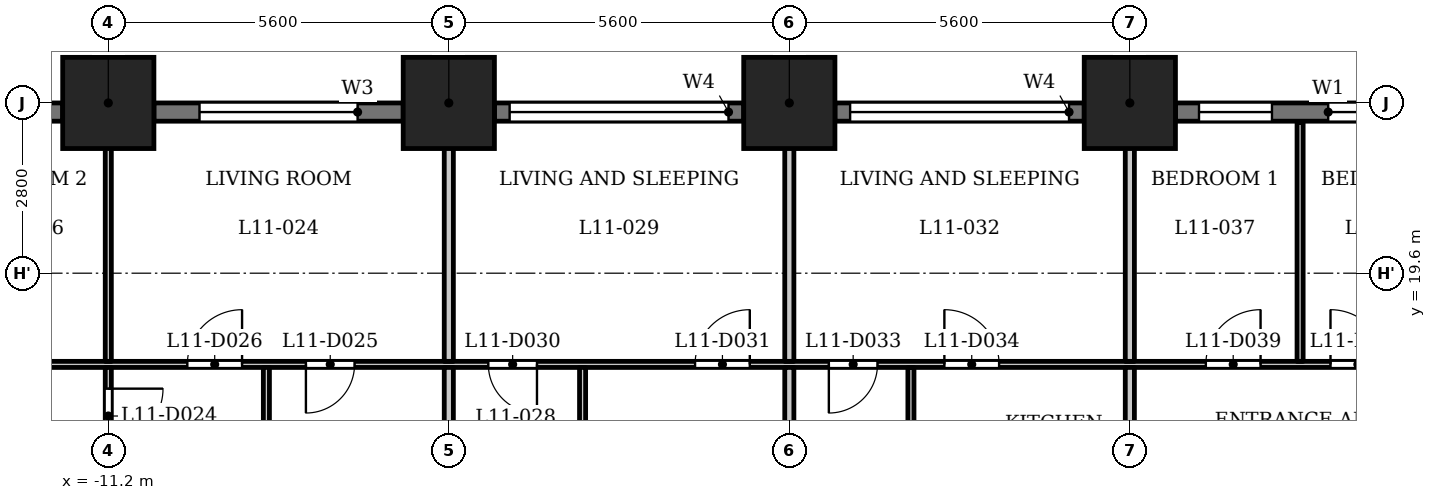
"""IFC4 building model, lengths in metres.
Left out: names, types, materials, properties, quantities, classifications, styles, units other than length and angle.
Written with IfcOpenShell. Run it as: python <this file> out.ifc"""

import sys

from ifc_helpers import new_model, si_unit, direction, frame, frame_2d, origin, origin_2d, place, context, subcontext, project, spatial, rectangle, extrude, element, fill, save


model = new_model("IFC4")
c1 = context("Model", 3, precision=1e-05, world=origin(), true_north=direction((0.0, 1.0)))
c2 = subcontext(c1, "Body", "Model", "MODEL_VIEW")
j1 = project(units=[si_unit("LENGTHUNIT", "METRE"), si_unit("PLANEANGLEUNIT", "RADIAN")], contexts=[c1])
p1 = place(None, origin())
s1 = spatial("IfcSite", under=j1, at=p1, CompositionType="ELEMENT")
p2 = place(p1, origin())
s2 = spatial("IfcBuilding", under=s1, at=p2, CompositionType="ELEMENT")
p3 = place(p2, frame((0.0, 0.0, 48.0)))
s3 = spatial("IfcBuildingStorey", under=s2, at=p3, CompositionType="ELEMENT", Elevation=48.0)
for number, where, z_axis, x_axis in (
    (1, (5.6, 22.4, 0.0), (0.0, 0.0, 1.0), (1.0, 0.0, 0.0)),
    (2, (0.0, 22.4, 0.0), (0.0, 0.0, 1.0), (1.0, 0.0, 0.0)),
    (3, (-5.6, 22.4, 0.0), (0.0, 0.0, 1.0), (1.0, 0.0, 0.0)),
    (4, (-11.2, 22.4, 0.0), (0.0, 0.0, 1.0), (1.0, 0.0, 0.0)),
):
    element("IfcColumn", number, at=place(p3, frame(where, z_axis=z_axis, x_axis=x_axis)), inside=s3, PredefinedType="COLUMN", context=c2, shape_type="SweptSolid", body=[
        extrude(rectangle(XDim=1.5, YDim=1.5, at=origin_2d()), origin(), (0.0, 0.0, 1.0), 3.5),
    ])
p4 = place(p3, frame((10.45, 22.25, 0.0), z_axis=(0.0, 0.0, 1.0), x_axis=(-1.0, 0.0, 0.0)))
e5 = element("IfcWall", 5, at=p4, inside=s3, PredefinedType="SOLIDWALL", context=c2, shape_type="SweptSolid", body=[
    extrude(rectangle(XDim=4.1, YDim=0.3, at=frame_2d((2.05, 0.0))), origin(), (0.0, 0.0, 1.0), 2.35),
])
p5 = place(p4, frame((0.387, 0.0, 0.6)))
e6 = element("IfcOpeningElement", 6, at=p5, cuts=e5, PredefinedType="OPENING", context=c2, shape_type="SweptSolid", body=[
    extrude(rectangle(XDim=1.2, YDim=1.55, at=frame_2d((0.6, 0.775))), frame((0.0, 0.16, 0.0), z_axis=(0.0, -1.0, 0.0), x_axis=(1.0, 0.0, 0.0)), (0.0, 0.0, 1.0), 0.32),
])
p6 = place(p4, frame((2.512, 0.0, 0.6)))
e7 = element("IfcOpeningElement", 7, at=p6, cuts=e5, PredefinedType="OPENING", context=c2, shape_type="SweptSolid", body=[
    extrude(rectangle(XDim=1.2, YDim=1.55, at=frame_2d((0.6, 0.775))), frame((0.0, 0.16, 0.0), z_axis=(0.0, -1.0, 0.0), x_axis=(1.0, 0.0, 0.0)), (0.0, 0.0, 1.0), 0.32),
])
p7 = place(p3, frame((4.85, 22.25, 0.0), z_axis=(0.0, 0.0, 1.0), x_axis=(-1.0, 0.0, 0.0)))
e8 = element("IfcWall", 8, at=p7, inside=s3, PredefinedType="SOLIDWALL", context=c2, shape_type="SweptSolid", body=[
    extrude(rectangle(XDim=4.1, YDim=0.3, at=frame_2d((2.05, 0.0))), origin(), (0.0, 0.0, 1.0), 2.35),
])
p8 = place(p7, frame((0.25, 0.0, 1.2)))
e9 = element("IfcOpeningElement", 9, at=p8, cuts=e8, PredefinedType="OPENING", context=c2, shape_type="SweptSolid", body=[
    extrude(rectangle(XDim=3.6, YDim=0.95, at=frame_2d((1.8, 0.475))), frame((0.0, 0.16, 0.0), z_axis=(0.0, -1.0, 0.0), x_axis=(1.0, 0.0, 0.0)), (0.0, 0.0, 1.0), 0.32),
])
p9 = place(p3, frame((-0.75, 22.25, 0.0), z_axis=(0.0, 0.0, 1.0), x_axis=(-1.0, 0.0, 0.0)))
e10 = element("IfcWall", 10, at=p9, inside=s3, PredefinedType="SOLIDWALL", context=c2, shape_type="SweptSolid", body=[
    extrude(rectangle(XDim=4.1, YDim=0.3, at=frame_2d((2.05, 0.0))), origin(), (0.0, 0.0, 1.0), 2.35),
])
p10 = place(p9, frame((0.25, 0.0, 1.2)))
e11 = element("IfcOpeningElement", 11, at=p10, cuts=e10, PredefinedType="OPENING", context=c2, shape_type="SweptSolid", body=[
    extrude(rectangle(XDim=3.6, YDim=0.95, at=frame_2d((1.8, 0.475))), frame((0.0, 0.16, 0.0), z_axis=(0.0, -1.0, 0.0), x_axis=(1.0, 0.0, 0.0)), (0.0, 0.0, 1.0), 0.32),
])
p11 = place(p3, frame((-6.35, 22.25, 0.0), z_axis=(0.0, 0.0, 1.0), x_axis=(-1.0, 0.0, 0.0)))
e12 = element("IfcWall", 12, at=p11, inside=s3, PredefinedType="SOLIDWALL", context=c2, shape_type="SweptSolid", body=[
    extrude(rectangle(XDim=4.1, YDim=0.3, at=frame_2d((2.05, 0.0))), origin(), (0.0, 0.0, 1.0), 2.35),
])
p12 = place(p11, frame((0.75, 0.0, 0.9)))
e13 = element("IfcOpeningElement", 13, at=p12, cuts=e12, PredefinedType="OPENING", context=c2, shape_type="SweptSolid", body=[
    extrude(rectangle(XDim=2.6, YDim=1.25, at=frame_2d((1.3, 0.625))), frame((0.0, 0.16, 0.0), z_axis=(0.0, -1.0, 0.0), x_axis=(1.0, 0.0, 0.0)), (0.0, 0.0, 1.0), 0.32),
])
p13 = place(p3, frame((-11.95, 22.25, 0.0), z_axis=(0.0, 0.0, 1.0), x_axis=(-1.0, 0.0, 0.0)))
e14 = element("IfcWall", 14, at=p13, inside=s3, PredefinedType="SOLIDWALL", context=c2, shape_type="SweptSolid", body=[
    extrude(rectangle(XDim=4.1, YDim=0.3, at=frame_2d((2.05, 0.0))), origin(), (0.0, 0.0, 1.0), 2.35),
])
p14 = place(p13, frame((0.387, 0.0, 0.6)))
e15 = element("IfcOpeningElement", 15, at=p14, cuts=e14, PredefinedType="OPENING", context=c2, shape_type="SweptSolid", body=[
    extrude(rectangle(XDim=1.2, YDim=1.55, at=frame_2d((0.6, 0.775))), frame((0.0, 0.16, 0.0), z_axis=(0.0, -1.0, 0.0), x_axis=(1.0, 0.0, 0.0)), (0.0, 0.0, 1.0), 0.32),
])
p15 = place(p13, frame((2.512, 0.0, 0.6)))
e16 = element("IfcOpeningElement", 16, at=p15, cuts=e14, PredefinedType="OPENING", context=c2, shape_type="SweptSolid", body=[
    extrude(rectangle(XDim=1.2, YDim=1.55, at=frame_2d((0.6, 0.775))), frame((0.0, 0.16, 0.0), z_axis=(0.0, -1.0, 0.0), x_axis=(1.0, 0.0, 0.0)), (0.0, 0.0, 1.0), 0.32),
])
p16 = place(p3, frame((-26.44, 18.1, 0.0), z_axis=(0.0, 0.0, 1.0), x_axis=(1.0, 0.0, 0.0)))
e17 = element("IfcWall", 17, at=p16, inside=s3, PredefinedType="PARTITIONING", context=c2, shape_type="SweptSolid", body=[
    extrude(rectangle(XDim=52.63, YDim=0.1, at=frame_2d((26.315, 0.0))), origin(), (0.0, 0.0, 1.0), 3.2),
])
p17 = place(p16, frame((2.626, 0.0, 0.0)))
e18 = element("IfcOpeningElement", 18, at=p17, cuts=e17, PredefinedType="OPENING", context=c2, shape_type="SweptSolid", body=[
    extrude(rectangle(XDim=0.8, YDim=2.1, at=frame_2d((0.4, 1.05))), frame((0.0, 0.06, 0.0), z_axis=(0.0, -1.0, 0.0), x_axis=(1.0, 0.0, 0.0)), (0.0, 0.0, 1.0), 0.12),
])
p18 = place(p16, frame((7.84, 0.0, 0.0)))
e19 = element("IfcOpeningElement", 19, at=p18, cuts=e17, PredefinedType="OPENING", context=c2, shape_type="SweptSolid", body=[
    extrude(rectangle(XDim=0.9, YDim=2.1, at=frame_2d((0.45, 1.05))), frame((0.0, 0.06, 0.0), z_axis=(0.0, -1.0, 0.0), x_axis=(1.0, 0.0, 0.0)), (0.0, 0.0, 1.0), 0.12),
])
p19 = place(p16, frame((18.49, 0.0, 0.0)))
e20 = element("IfcOpeningElement", 20, at=p19, cuts=e17, PredefinedType="OPENING", context=c2, shape_type="SweptSolid", body=[
    extrude(rectangle(XDim=0.8, YDim=2.1, at=frame_2d((0.4, 1.05))), frame((0.0, 0.06, 0.0), z_axis=(0.0, -1.0, 0.0), x_axis=(1.0, 0.0, 0.0)), (0.0, 0.0, 1.0), 0.12),
])
p20 = place(p16, frame((16.54, 0.0, 0.0)))
e21 = element("IfcOpeningElement", 21, at=p20, cuts=e17, PredefinedType="OPENING", context=c2, shape_type="SweptSolid", body=[
    extrude(rectangle(XDim=0.9, YDim=2.1, at=frame_2d((0.45, 1.05))), frame((0.0, 0.06, 0.0), z_axis=(0.0, -1.0, 0.0), x_axis=(1.0, 0.0, 0.0)), (0.0, 0.0, 1.0), 0.12),
])
p21 = place(p16, frame((10.89, 0.0, 0.0)))
e22 = element("IfcOpeningElement", 22, at=p21, cuts=e17, PredefinedType="OPENING", context=c2, shape_type="SweptSolid", body=[
    extrude(rectangle(XDim=0.9, YDim=2.1, at=frame_2d((0.45, 1.05))), frame((0.0, 0.06, 0.0), z_axis=(0.0, -1.0, 0.0), x_axis=(1.0, 0.0, 0.0)), (0.0, 0.0, 1.0), 0.12),
])
p22 = place(p16, frame((12.94, 0.0, 0.0)))
e23 = element("IfcOpeningElement", 23, at=p22, cuts=e17, PredefinedType="OPENING", context=c2, shape_type="SweptSolid", body=[
    extrude(rectangle(XDim=0.9, YDim=2.1, at=frame_2d((0.45, 1.05))), frame((0.0, 0.06, 0.0), z_axis=(0.0, -1.0, 0.0), x_axis=(1.0, 0.0, 0.0)), (0.0, 0.0, 1.0), 0.12),
])
p23 = place(p16, frame((21.49, 0.0, 0.0)))
e24 = element("IfcOpeningElement", 24, at=p23, cuts=e17, PredefinedType="OPENING", context=c2, shape_type="SweptSolid", body=[
    extrude(rectangle(XDim=0.8, YDim=2.1, at=frame_2d((0.4, 1.05))), frame((0.0, 0.06, 0.0), z_axis=(0.0, -1.0, 0.0), x_axis=(1.0, 0.0, 0.0)), (0.0, 0.0, 1.0), 0.12),
])
p24 = place(p16, frame((24.89, 0.0, 0.0)))
e25 = element("IfcOpeningElement", 25, at=p24, cuts=e17, PredefinedType="OPENING", context=c2, shape_type="SweptSolid", body=[
    extrude(rectangle(XDim=0.9, YDim=2.1, at=frame_2d((0.45, 1.05))), frame((0.0, 0.06, 0.0), z_axis=(0.0, -1.0, 0.0), x_axis=(1.0, 0.0, 0.0)), (0.0, 0.0, 1.0), 0.12),
])
p25 = place(p16, frame((27.09, 0.0, 0.0)))
e26 = element("IfcOpeningElement", 26, at=p25, cuts=e17, PredefinedType="OPENING", context=c2, shape_type="SweptSolid", body=[
    extrude(rectangle(XDim=0.8, YDim=2.1, at=frame_2d((0.4, 1.05))), frame((0.0, 0.06, 0.0), z_axis=(0.0, -1.0, 0.0), x_axis=(1.0, 0.0, 0.0)), (0.0, 0.0, 1.0), 0.12),
])
p26 = place(p16, frame((28.99, 0.0, 0.0)))
e27 = element("IfcOpeningElement", 27, at=p26, cuts=e17, PredefinedType="OPENING", context=c2, shape_type="SweptSolid", body=[
    extrude(rectangle(XDim=0.9, YDim=2.1, at=frame_2d((0.45, 1.05))), frame((0.0, 0.06, 0.0), z_axis=(0.0, -1.0, 0.0), x_axis=(1.0, 0.0, 0.0)), (0.0, 0.0, 1.0), 0.12),
])
p27 = place(p16, frame((41.69, 0.0, 0.0)))
e28 = element("IfcOpeningElement", 28, at=p27, cuts=e17, PredefinedType="OPENING", context=c2, shape_type="SweptSolid", body=[
    extrude(rectangle(XDim=0.8, YDim=2.1, at=frame_2d((0.4, 1.05))), frame((0.0, 0.06, 0.0), z_axis=(0.0, -1.0, 0.0), x_axis=(1.0, 0.0, 0.0)), (0.0, 0.0, 1.0), 0.12),
])
p28 = place(p16, frame((38.99, 0.0, 0.0)))
e29 = element("IfcOpeningElement", 29, at=p28, cuts=e17, PredefinedType="OPENING", context=c2, shape_type="SweptSolid", body=[
    extrude(rectangle(XDim=0.9, YDim=2.1, at=frame_2d((0.45, 1.05))), frame((0.0, 0.06, 0.0), z_axis=(0.0, -1.0, 0.0), x_axis=(1.0, 0.0, 0.0)), (0.0, 0.0, 1.0), 0.12),
])
p29 = place(p16, frame((33.29, 0.0, 0.0)))
e30 = element("IfcOpeningElement", 30, at=p29, cuts=e17, PredefinedType="OPENING", context=c2, shape_type="SweptSolid", body=[
    extrude(rectangle(XDim=0.9, YDim=2.1, at=frame_2d((0.45, 1.05))), frame((0.0, 0.06, 0.0), z_axis=(0.0, -1.0, 0.0), x_axis=(1.0, 0.0, 0.0)), (0.0, 0.0, 1.0), 0.12),
])
p30 = place(p16, frame((35.34, 0.0, 0.0)))
e31 = element("IfcOpeningElement", 31, at=p30, cuts=e17, PredefinedType="OPENING", context=c2, shape_type="SweptSolid", body=[
    extrude(rectangle(XDim=0.9, YDim=2.1, at=frame_2d((0.45, 1.05))), frame((0.0, 0.06, 0.0), z_axis=(0.0, -1.0, 0.0), x_axis=(1.0, 0.0, 0.0)), (0.0, 0.0, 1.0), 0.12),
])
p31 = place(p16, frame((50.74, 0.0, 0.0)))
e32 = element("IfcOpeningElement", 32, at=p31, cuts=e17, PredefinedType="OPENING", context=c2, shape_type="SweptSolid", body=[
    extrude(rectangle(XDim=0.8, YDim=2.1, at=frame_2d((0.4, 1.05))), frame((0.0, 0.06, 0.0), z_axis=(0.0, -1.0, 0.0), x_axis=(1.0, 0.0, 0.0)), (0.0, 0.0, 1.0), 0.12),
])
p32 = place(p16, frame((47.29, 0.0, 0.0)))
e33 = element("IfcOpeningElement", 33, at=p32, cuts=e17, PredefinedType="OPENING", context=c2, shape_type="SweptSolid", body=[
    extrude(rectangle(XDim=0.9, YDim=2.1, at=frame_2d((0.45, 1.05))), frame((0.0, 0.06, 0.0), z_axis=(0.0, -1.0, 0.0), x_axis=(1.0, 0.0, 0.0)), (0.0, 0.0, 1.0), 0.12),
])
p33 = place(p3, frame((-11.2, 15.475, 0.0), z_axis=(0.0, 0.0, 1.0), x_axis=(0.0, 1.0, 0.0)))
e34 = element("IfcWall", 34, at=p33, inside=s3, PredefinedType="PARTITIONING", context=c2, shape_type="SweptSolid", body=[
    extrude(rectangle(XDim=2.575, YDim=0.1, at=frame_2d((1.288, 0.0))), origin(), (0.0, 0.0, 1.0), 3.2),
])
p34 = place(p33, frame((1.326, 0.0, 0.0)))
e35 = element("IfcOpeningElement", 35, at=p34, cuts=e34, PredefinedType="OPENING", context=c2, shape_type="SweptSolid", body=[
    extrude(rectangle(XDim=0.9, YDim=2.1, at=frame_2d((0.45, 1.05))), frame((0.0, 0.06, 0.0), z_axis=(0.0, -1.0, 0.0), x_axis=(1.0, 0.0, 0.0)), (0.0, 0.0, 1.0), 0.12),
])
p35 = place(p3, frame((-11.2, 18.15, 0.0), z_axis=(0.0, 0.0, 1.0), x_axis=(0.0, 1.0, 0.0)))
e36 = element("IfcWall", 36, at=p35, inside=s3, PredefinedType="PARTITIONING", context=c2, shape_type="SweptSolid", body=[
    extrude(rectangle(XDim=4.98, YDim=0.1, at=frame_2d((2.49, 0.0))), origin(), (0.0, 0.0, 1.0), 3.2),
])
p36 = place(p3, frame((-8.6, 15.475, 0.0), z_axis=(0.0, 0.0, 1.0), x_axis=(0.0, 1.0, 0.0)))
e37 = element("IfcWall", 37, at=p36, inside=s3, PredefinedType="PARTITIONING", context=c2, shape_type="SweptSolid", body=[
    extrude(rectangle(XDim=2.575, YDim=0.1, at=frame_2d((1.288, 0.0))), origin(), (0.0, 0.0, 1.0), 3.2),
])
p37 = place(p3, frame((-5.6, 15.475, 0.0), z_axis=(0.0, 0.0, 1.0), x_axis=(0.0, 1.0, 0.0)))
e38 = element("IfcWall", 38, at=p37, inside=s3, PredefinedType="PARTITIONING", context=c2, shape_type="SweptSolid", body=[
    extrude(rectangle(XDim=2.575, YDim=0.15, at=frame_2d((1.288, 0.0))), origin(), (0.0, 0.0, 1.0), 3.2),
])
p38 = place(p3, frame((-5.6, 18.15, 0.0), z_axis=(0.0, 0.0, 1.0), x_axis=(0.0, 1.0, 0.0)))
e39 = element("IfcWall", 39, at=p38, inside=s3, PredefinedType="PARTITIONING", context=c2, shape_type="SweptSolid", body=[
    extrude(rectangle(XDim=4.98, YDim=0.15, at=frame_2d((2.49, 0.0))), origin(), (0.0, 0.0, 1.0), 3.2),
])
p39 = place(p3, frame((-3.4, 15.475, 0.0), z_axis=(0.0, 0.0, 1.0), x_axis=(0.0, 1.0, 0.0)))
e40 = element("IfcWall", 40, at=p39, inside=s3, PredefinedType="PARTITIONING", context=c2, shape_type="SweptSolid", body=[
    extrude(rectangle(XDim=2.575, YDim=0.1, at=frame_2d((1.288, 0.0))), origin(), (0.0, 0.0, 1.0), 3.2),
])
p40 = place(p3, frame((0.0, 15.475, 0.0), z_axis=(0.0, 0.0, 1.0), x_axis=(0.0, 1.0, 0.0)))
e41 = element("IfcWall", 41, at=p40, inside=s3, PredefinedType="PARTITIONING", context=c2, shape_type="SweptSolid", body=[
    extrude(rectangle(XDim=2.575, YDim=0.15, at=frame_2d((1.288, 0.0))), origin(), (0.0, 0.0, 1.0), 3.2),
])
p41 = place(p3, frame((0.0, 18.15, 0.0), z_axis=(0.0, 0.0, 1.0), x_axis=(0.0, 1.0, 0.0)))
e42 = element("IfcWall", 42, at=p41, inside=s3, PredefinedType="PARTITIONING", context=c2, shape_type="SweptSolid", body=[
    extrude(rectangle(XDim=4.98, YDim=0.15, at=frame_2d((2.49, 0.0))), origin(), (0.0, 0.0, 1.0), 3.2),
])
p42 = place(p3, frame((2.0, 15.475, 0.0), z_axis=(0.0, 0.0, 1.0), x_axis=(0.0, 1.0, 0.0)))
e43 = element("IfcWall", 43, at=p42, inside=s3, PredefinedType="PARTITIONING", context=c2, shape_type="SweptSolid", body=[
    extrude(rectangle(XDim=2.575, YDim=0.1, at=frame_2d((1.288, 0.0))), origin(), (0.0, 0.0, 1.0), 3.2),
])
p43 = place(p3, frame((5.6, 15.475, 0.0), z_axis=(0.0, 0.0, 1.0), x_axis=(0.0, 1.0, 0.0)))
e44 = element("IfcWall", 44, at=p43, inside=s3, PredefinedType="PARTITIONING", context=c2, shape_type="SweptSolid", body=[
    extrude(rectangle(XDim=2.575, YDim=0.15, at=frame_2d((1.288, 0.0))), origin(), (0.0, 0.0, 1.0), 3.2),
])
p44 = place(p3, frame((5.6, 18.15, 0.0), z_axis=(0.0, 0.0, 1.0), x_axis=(0.0, 1.0, 0.0)))
e45 = element("IfcWall", 45, at=p44, inside=s3, PredefinedType="PARTITIONING", context=c2, shape_type="SweptSolid", body=[
    extrude(rectangle(XDim=4.98, YDim=0.15, at=frame_2d((2.49, 0.0))), origin(), (0.0, 0.0, 1.0), 3.2),
])
p45 = place(p3, frame((8.4, 18.15, 0.0), z_axis=(0.0, 0.0, 1.0), x_axis=(0.0, 1.0, 0.0)))
e46 = element("IfcWall", 46, at=p45, inside=s3, PredefinedType="PARTITIONING", context=c2, shape_type="SweptSolid", body=[
    extrude(rectangle(XDim=3.93, YDim=0.1, at=frame_2d((1.965, 0.0))), origin(), (0.0, 0.0, 1.0), 3.2),
])
p46 = place(p34, origin())
e47 = element("IfcDoor", 47, at=p46, inside=s3, OperationType="SINGLE_SWING_RIGHT", PredefinedType="DOOR", context=c2, shape_type="SweptSolid", body=[
    extrude(rectangle(XDim=0.9, YDim=2.1, at=frame_2d((0.45, 1.05))), frame((0.0, 0.025, 0.0), z_axis=(0.0, -1.0, 0.0), x_axis=(1.0, 0.0, 0.0)), (0.0, 0.0, 1.0), 0.05),
])
fill(e35, e47)
p47 = place(p19, origin())
e48 = element("IfcDoor", 48, at=p47, inside=s3, OperationType="SINGLE_SWING_LEFT", PredefinedType="DOOR", context=c2, shape_type="SweptSolid", body=[
    extrude(rectangle(XDim=0.8, YDim=2.1, at=frame_2d((0.4, 1.05))), frame((0.0, 0.025, 0.0), z_axis=(0.0, -1.0, 0.0), x_axis=(1.0, 0.0, 0.0)), (0.0, 0.0, 1.0), 0.05),
])
fill(e20, e48)
p48 = place(p20, origin())
e49 = element("IfcDoor", 49, at=p48, inside=s3, OperationType="SINGLE_SWING_LEFT", PredefinedType="DOOR", context=c2, shape_type="SweptSolid", body=[
    extrude(rectangle(XDim=0.9, YDim=2.1, at=frame_2d((0.45, 1.05))), frame((0.0, 0.025, 0.0), z_axis=(0.0, -1.0, 0.0), x_axis=(1.0, 0.0, 0.0)), (0.0, 0.0, 1.0), 0.05),
])
fill(e21, e49)
p49 = place(p23, origin())
e50 = element("IfcDoor", 50, at=p49, inside=s3, OperationType="SINGLE_SWING_RIGHT", PredefinedType="DOOR", context=c2, shape_type="SweptSolid", body=[
    extrude(rectangle(XDim=0.8, YDim=2.1, at=frame_2d((0.4, 1.05))), frame((0.0, 0.025, 0.0), z_axis=(0.0, -1.0, 0.0), x_axis=(1.0, 0.0, 0.0)), (0.0, 0.0, 1.0), 0.05),
])
fill(e24, e50)
p50 = place(p24, origin())
e51 = element("IfcDoor", 51, at=p50, inside=s3, OperationType="SINGLE_SWING_LEFT", PredefinedType="DOOR", context=c2, shape_type="SweptSolid", body=[
    extrude(rectangle(XDim=0.9, YDim=2.1, at=frame_2d((0.45, 1.05))), frame((0.0, 0.025, 0.0), z_axis=(0.0, -1.0, 0.0), x_axis=(1.0, 0.0, 0.0)), (0.0, 0.0, 1.0), 0.05),
])
fill(e25, e51)
p51 = place(p25, origin())
e52 = element("IfcDoor", 52, at=p51, inside=s3, OperationType="SINGLE_SWING_LEFT", PredefinedType="DOOR", context=c2, shape_type="SweptSolid", body=[
    extrude(rectangle(XDim=0.8, YDim=2.1, at=frame_2d((0.4, 1.05))), frame((0.0, 0.025, 0.0), z_axis=(0.0, -1.0, 0.0), x_axis=(1.0, 0.0, 0.0)), (0.0, 0.0, 1.0), 0.05),
])
fill(e26, e52)
p52 = place(p26, origin())
e53 = element("IfcDoor", 53, at=p52, inside=s3, OperationType="SINGLE_SWING_RIGHT", PredefinedType="DOOR", context=c2, shape_type="SweptSolid", body=[
    extrude(rectangle(XDim=0.9, YDim=2.1, at=frame_2d((0.45, 1.05))), frame((0.0, 0.025, 0.0), z_axis=(0.0, -1.0, 0.0), x_axis=(1.0, 0.0, 0.0)), (0.0, 0.0, 1.0), 0.05),
])
fill(e27, e53)
p53 = place(p29, origin())
e54 = element("IfcDoor", 54, at=p53, inside=s3, OperationType="SINGLE_SWING_LEFT", PredefinedType="DOOR", context=c2, shape_type="SweptSolid", body=[
    extrude(rectangle(XDim=0.9, YDim=2.1, at=frame_2d((0.45, 1.05))), frame((0.0, 0.025, 0.0), z_axis=(0.0, -1.0, 0.0), x_axis=(1.0, 0.0, 0.0)), (0.0, 0.0, 1.0), 0.05),
])
fill(e30, e54)
p54 = place(p30, origin())
e55 = element("IfcDoor", 55, at=p54, inside=s3, OperationType="SINGLE_SWING_RIGHT", PredefinedType="DOOR", context=c2, shape_type="SweptSolid", body=[
    extrude(rectangle(XDim=0.9, YDim=2.1, at=frame_2d((0.45, 1.05))), frame((0.0, 0.025, 0.0), z_axis=(0.0, -1.0, 0.0), x_axis=(1.0, 0.0, 0.0)), (0.0, 0.0, 1.0), 0.05),
])
fill(e31, e55)
p55 = place(p5, origin())
e56 = element("IfcWindow", 56, at=p55, inside=s3, PartitioningType="SINGLE_PANEL", PredefinedType="WINDOW", context=c2, shape_type="SweptSolid", body=[
    extrude(rectangle(XDim=1.2, YDim=1.55, at=frame_2d((0.6, 0.775))), frame((0.0, 0.03, 0.0), z_axis=(0.0, -1.0, 0.0), x_axis=(1.0, 0.0, 0.0)), (0.0, 0.0, 1.0), 0.06),
])
fill(e6, e56)
p56 = place(p6, origin())
e57 = element("IfcWindow", 57, at=p56, inside=s3, PartitioningType="SINGLE_PANEL", PredefinedType="WINDOW", context=c2, shape_type="SweptSolid", body=[
    extrude(rectangle(XDim=1.2, YDim=1.55, at=frame_2d((0.6, 0.775))), frame((0.0, 0.03, 0.0), z_axis=(0.0, -1.0, 0.0), x_axis=(1.0, 0.0, 0.0)), (0.0, 0.0, 1.0), 0.06),
])
fill(e7, e57)
p57 = place(p8, origin())
e58 = element("IfcWindow", 58, at=p57, inside=s3, PartitioningType="SINGLE_PANEL", PredefinedType="WINDOW", context=c2, shape_type="SweptSolid", body=[
    extrude(rectangle(XDim=3.6, YDim=0.95, at=frame_2d((1.8, 0.475))), frame((0.0, 0.03, 0.0), z_axis=(0.0, -1.0, 0.0), x_axis=(1.0, 0.0, 0.0)), (0.0, 0.0, 1.0), 0.06),
])
fill(e9, e58)
p58 = place(p10, origin())
e59 = element("IfcWindow", 59, at=p58, inside=s3, PartitioningType="SINGLE_PANEL", PredefinedType="WINDOW", context=c2, shape_type="SweptSolid", body=[
    extrude(rectangle(XDim=3.6, YDim=0.95, at=frame_2d((1.8, 0.475))), frame((0.0, 0.03, 0.0), z_axis=(0.0, -1.0, 0.0), x_axis=(1.0, 0.0, 0.0)), (0.0, 0.0, 1.0), 0.06),
])
fill(e11, e59)
p59 = place(p12, origin())
e60 = element("IfcWindow", 60, at=p59, inside=s3, PartitioningType="SINGLE_PANEL", PredefinedType="WINDOW", context=c2, shape_type="SweptSolid", body=[
    extrude(rectangle(XDim=2.6, YDim=1.25, at=frame_2d((1.3, 0.625))), frame((0.0, 0.03, 0.0), z_axis=(0.0, -1.0, 0.0), x_axis=(1.0, 0.0, 0.0)), (0.0, 0.0, 1.0), 0.06),
])
fill(e13, e60)
save(model, sys.argv[1])
